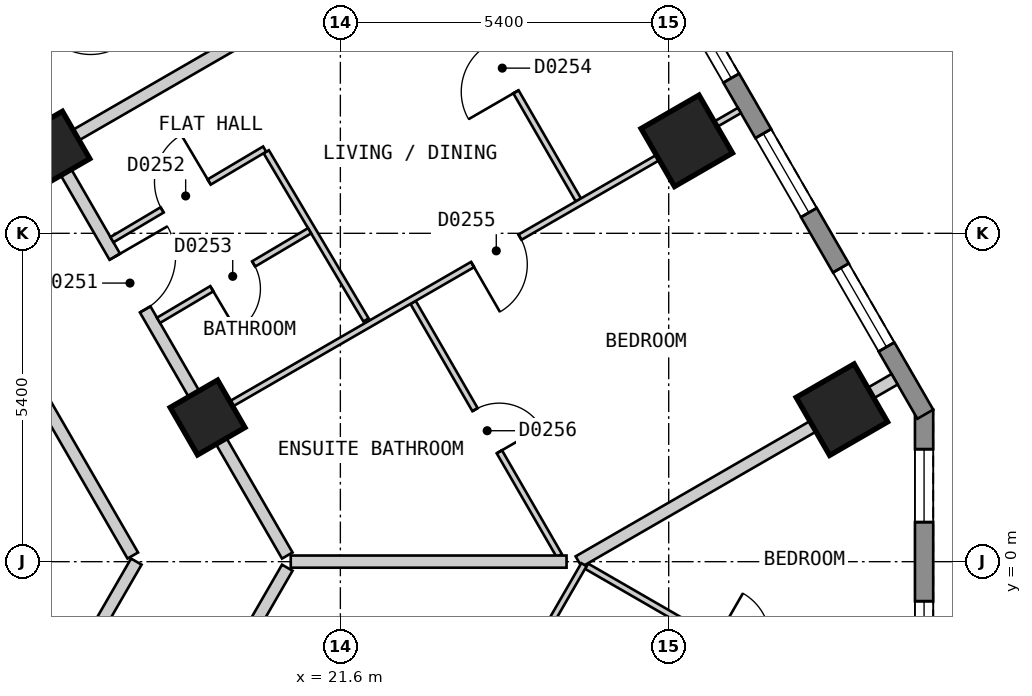
"""IFC4 building model, lengths in metres.
Left out: names, types, materials, properties, quantities, classifications, styles, units other than length and angle.
Written with IfcOpenShell. Run it as: python <this file> out.ifc"""

import sys

from ifc_helpers import new_model, si_unit, direction, frame, frame_2d, origin, origin_2d, place, context, subcontext, project, spatial, polyline, rectangle, outline, extrude, element, fill, save


model = new_model("IFC4")
c1 = context("Model", 3, precision=1e-05, world=origin(), true_north=direction((0.0, 1.0)))
c2 = subcontext(c1, "Body", "Model", "MODEL_VIEW")
j1 = project(units=[si_unit("LENGTHUNIT", "METRE"), si_unit("PLANEANGLEUNIT", "RADIAN")], contexts=[c1])
p1 = place(None, origin())
s1 = spatial("IfcSite", under=j1, at=p1, CompositionType="ELEMENT")
p2 = place(p1, origin())
s2 = spatial("IfcBuilding", under=s1, at=p2, CompositionType="ELEMENT")
p3 = place(p2, frame((0.0, 0.0, 47.4)))
s3 = spatial("IfcBuildingStorey", under=s2, at=p3, CompositionType="ELEMENT", Elevation=47.4)
for number, where, z_axis, x_axis in (
    (1, (29.848, 2.5, 0.0), (0.0, 0.0, 1.0), (-0.5, 0.866, 0.0)),
    (2, (27.297, 6.921, 0.0), (0.0, 0.0, 1.0), (-0.5, 0.866, 0.0)),
):
    element("IfcColumn", number, at=place(p3, frame(where, z_axis=z_axis, x_axis=x_axis)), inside=s3, PredefinedType="COLUMN", context=c2, shape_type="SweptSolid", body=[
        extrude(rectangle(XDim=1.1, YDim=1.1, at=origin_2d()), origin(), (0.0, 0.0, 1.0), 3.0),
    ])
for number, where, z_axis, x_axis in (
    (3, (19.416, 2.371, 0.0), (0.0, 0.0, 1.0), (-0.5, 0.866, 0.0)),
    (4, (16.864, 6.791, 0.0), (0.0, 0.0, 1.0), (-0.5, 0.866, 0.0)),
):
    element("IfcColumn", number, at=place(p3, frame(where, z_axis=z_axis, x_axis=x_axis)), inside=s3, PredefinedType="COLUMN", context=c2, shape_type="SweptSolid", body=[
        extrude(rectangle(XDim=0.9, YDim=0.9, at=origin_2d()), origin(), (0.0, 0.0, 1.0), 3.0),
    ])
p4 = place(p3, frame((31.2, -2.5, 0.0), z_axis=(0.0, 0.0, 1.0), x_axis=(0.0, 1.0, 0.0)))
e5 = element("IfcWall", 5, at=p4, inside=s3, PredefinedType="SOLIDWALL", context=c2, shape_type="SweptSolid", body=[
    extrude(outline(polyline([(0.0, -0.15), (5.0, -0.15), (4.92, 0.15), (0.08, 0.15), (0.0, -0.15)])), origin(), (0.0, 0.0, 1.0), 2.7),
])
p5 = place(p4, frame((0.65, 0.0, 0.15)))
e6 = element("IfcOpeningElement", 6, at=p5, cuts=e5, PredefinedType="OPENING", context=c2, shape_type="SweptSolid", body=[
    extrude(rectangle(XDim=1.2, YDim=2.1, at=frame_2d((0.6, 1.05))), frame((0.0, 0.16, 0.0), z_axis=(0.0, -1.0, 0.0), x_axis=(1.0, 0.0, 0.0)), (0.0, 0.0, 1.0), 0.32),
])
p6 = place(p4, frame((3.15, 0.0, 0.15)))
e7 = element("IfcOpeningElement", 7, at=p6, cuts=e5, PredefinedType="OPENING", context=c2, shape_type="SweptSolid", body=[
    extrude(rectangle(XDim=1.2, YDim=2.1, at=frame_2d((0.6, 1.05))), frame((0.0, 0.16, 0.0), z_axis=(0.0, -1.0, 0.0), x_axis=(1.0, 0.0, 0.0)), (0.0, 0.0, 1.0), 0.32),
])
p7 = place(p3, frame((31.22, 2.425, 0.0), z_axis=(0.0, 0.0, 1.0), x_axis=(-0.500001938803, 0.866024284413, 0.0)))
e8 = element("IfcWall", 8, at=p7, inside=s3, PredefinedType="SOLIDWALL", context=c2, shape_type="SweptSolid", body=[
    extrude(outline(polyline([(0.0, -0.15), (27.02, -0.15), (26.94, 0.15), (0.08, 0.15), (0.0, -0.15)])), origin(), (0.0, 0.0, 1.0), 2.7),
])
p8 = place(p7, frame((1.277, 0.0, 0.15)))
e9 = element("IfcOpeningElement", 9, at=p8, cuts=e8, PredefinedType="OPENING", context=c2, shape_type="SweptSolid", body=[
    extrude(rectangle(XDim=1.5, YDim=2.1, at=frame_2d((0.75, 1.05))), frame((0.0, 0.16, 0.0), z_axis=(0.0, -1.0, 0.0), x_axis=(1.0, 0.0, 0.0)), (0.0, 0.0, 1.0), 0.32),
])
p9 = place(p7, frame((3.829, 0.0, 0.15)))
e10 = element("IfcOpeningElement", 10, at=p9, cuts=e8, PredefinedType="OPENING", context=c2, shape_type="SweptSolid", body=[
    extrude(rectangle(XDim=1.5, YDim=2.1, at=frame_2d((0.75, 1.05))), frame((0.0, 0.16, 0.0), z_axis=(0.0, -1.0, 0.0), x_axis=(1.0, 0.0, 0.0)), (0.0, 0.0, 1.0), 0.32),
])
p10 = place(p7, frame((6.382, 0.0, 0.15)))
e11 = element("IfcOpeningElement", 11, at=p10, cuts=e8, PredefinedType="OPENING", context=c2, shape_type="SweptSolid", body=[
    extrude(rectangle(XDim=1.5, YDim=2.1, at=frame_2d((0.75, 1.05))), frame((0.0, 0.16, 0.0), z_axis=(0.0, -1.0, 0.0), x_axis=(1.0, 0.0, 0.0)), (0.0, 0.0, 1.0), 0.32),
])
p11 = place(p7, frame((8.933, 0.0, 0.15)))
e12 = element("IfcOpeningElement", 12, at=p11, cuts=e8, PredefinedType="OPENING", context=c2, shape_type="SweptSolid", body=[
    extrude(rectangle(XDim=1.5, YDim=2.1, at=frame_2d((0.75, 1.05))), frame((0.0, 0.16, 0.0), z_axis=(0.0, -1.0, 0.0), x_axis=(1.0, 0.0, 0.0)), (0.0, 0.0, 1.0), 0.32),
])
p12 = place(p7, frame((11.485, 0.0, 0.15)))
e13 = element("IfcOpeningElement", 13, at=p12, cuts=e8, PredefinedType="OPENING", context=c2, shape_type="SweptSolid", body=[
    extrude(rectangle(XDim=1.5, YDim=2.1, at=frame_2d((0.75, 1.05))), frame((0.0, 0.16, 0.0), z_axis=(0.0, -1.0, 0.0), x_axis=(1.0, 0.0, 0.0)), (0.0, 0.0, 1.0), 0.32),
])
p13 = place(p7, frame((14.037, 0.0, 0.15)))
e14 = element("IfcOpeningElement", 14, at=p13, cuts=e8, PredefinedType="OPENING", context=c2, shape_type="SweptSolid", body=[
    extrude(rectangle(XDim=1.5, YDim=2.1, at=frame_2d((0.75, 1.05))), frame((0.0, 0.16, 0.0), z_axis=(0.0, -1.0, 0.0), x_axis=(1.0, 0.0, 0.0)), (0.0, 0.0, 1.0), 0.32),
])
p14 = place(p7, frame((16.589, 0.0, 0.15)))
e15 = element("IfcOpeningElement", 15, at=p14, cuts=e8, PredefinedType="OPENING", context=c2, shape_type="SweptSolid", body=[
    extrude(rectangle(XDim=1.5, YDim=2.1, at=frame_2d((0.75, 1.05))), frame((0.0, 0.16, 0.0), z_axis=(0.0, -1.0, 0.0), x_axis=(1.0, 0.0, 0.0)), (0.0, 0.0, 1.0), 0.32),
])
p15 = place(p7, frame((19.141, 0.0, 0.15)))
e16 = element("IfcOpeningElement", 16, at=p15, cuts=e8, PredefinedType="OPENING", context=c2, shape_type="SweptSolid", body=[
    extrude(rectangle(XDim=1.5, YDim=2.1, at=frame_2d((0.75, 1.05))), frame((0.0, 0.16, 0.0), z_axis=(0.0, -1.0, 0.0), x_axis=(1.0, 0.0, 0.0)), (0.0, 0.0, 1.0), 0.32),
])
p16 = place(p7, frame((21.693, 0.0, 0.15)))
e17 = element("IfcOpeningElement", 17, at=p16, cuts=e8, PredefinedType="OPENING", context=c2, shape_type="SweptSolid", body=[
    extrude(rectangle(XDim=1.5, YDim=2.1, at=frame_2d((0.75, 1.05))), frame((0.0, 0.16, 0.0), z_axis=(0.0, -1.0, 0.0), x_axis=(1.0, 0.0, 0.0)), (0.0, 0.0, 1.0), 0.32),
])
p17 = place(p7, frame((24.244, 0.0, 0.15)))
e18 = element("IfcOpeningElement", 18, at=p17, cuts=e8, PredefinedType="OPENING", context=c2, shape_type="SweptSolid", body=[
    extrude(rectangle(XDim=1.5, YDim=2.1, at=frame_2d((0.75, 1.05))), frame((0.0, 0.16, 0.0), z_axis=(0.0, -1.0, 0.0), x_axis=(1.0, 0.0, 0.0)), (0.0, 0.0, 1.0), 0.32),
])
p18 = place(p3, frame((9.18, 15.7, 0.0), z_axis=(0.0, 0.0, 1.0), x_axis=(0.500003652032, -0.866023295272, 0.0)))
e19 = element("IfcWall", 19, at=p18, inside=s3, PredefinedType="PARTITIONING", context=c2, shape_type="SweptSolid", body=[
    extrude(rectangle(XDim=18.012, YDim=0.2, at=frame_2d((9.006, 0.0))), origin(), (0.0, 0.0, 1.0), 2.7),
])
p19 = place(p18, frame((8.556, 0.0, 0.0)))
e20 = element("IfcOpeningElement", 20, at=p19, cuts=e19, PredefinedType="OPENING", context=c2, shape_type="SweptSolid", body=[
    extrude(rectangle(XDim=0.9, YDim=2.1, at=frame_2d((0.45, 1.05))), frame((0.0, 0.11, 0.0), z_axis=(0.0, -1.0, 0.0), x_axis=(1.0, 0.0, 0.0)), (0.0, 0.0, 1.0), 0.22),
])
p20 = place(p3, frame((10.45, 17.9, 0.0), z_axis=(0.0, 0.0, 1.0), x_axis=(0.500034352617, -0.866005569383, 0.0)))
e21 = element("IfcWall", 21, at=p20, inside=s3, PredefinedType="PARTITIONING", context=c2, shape_type="SweptSolid", body=[
    extrude(rectangle(XDim=20.553, YDim=0.2, at=frame_2d((10.276, 0.0))), origin(), (0.0, 0.0, 1.0), 2.7),
])
p21 = place(p20, frame((14.879, 0.0, 0.0)))
e22 = element("IfcOpeningElement", 22, at=p21, cuts=e21, PredefinedType="OPENING", context=c2, shape_type="SweptSolid", body=[
    extrude(rectangle(XDim=1.0, YDim=2.1, at=frame_2d((0.5, 1.05))), frame((0.0, 0.11, 0.0), z_axis=(0.0, -1.0, 0.0), x_axis=(1.0, 0.0, 0.0)), (0.0, 0.0, 1.0), 0.22),
])
p22 = place(p20, frame((9.775, 0.0, 0.0)))
e23 = element("IfcOpeningElement", 23, at=p22, cuts=e21, PredefinedType="OPENING", context=c2, shape_type="SweptSolid", body=[
    extrude(rectangle(XDim=1.0, YDim=2.1, at=frame_2d((0.5, 1.05))), frame((0.0, 0.11, 0.0), z_axis=(0.0, -1.0, 0.0), x_axis=(1.0, 0.0, 0.0)), (0.0, 0.0, 1.0), 0.22),
])
p23 = place(p20, frame((4.671, 0.0, 0.0)))
e24 = element("IfcOpeningElement", 24, at=p23, cuts=e21, PredefinedType="OPENING", context=c2, shape_type="SweptSolid", body=[
    extrude(rectangle(XDim=1.0, YDim=2.1, at=frame_2d((0.5, 1.05))), frame((0.0, 0.11, 0.0), z_axis=(0.0, -1.0, 0.0), x_axis=(1.0, 0.0, 0.0)), (0.0, 0.0, 1.0), 0.22),
])
p24 = place(p3, frame((15.6, -4.579, 0.0), z_axis=(0.0, 0.0, 1.0), x_axis=(0.499927597274, 0.866067201483, 0.0)))
e25 = element("IfcWall", 25, at=p24, inside=s3, PredefinedType="PARTITIONING", context=c2, shape_type="SweptSolid", body=[
    extrude(rectangle(XDim=5.288, YDim=0.2, at=frame_2d((2.644, 0.0))), origin(), (0.0, 0.0, 1.0), 2.7),
])
p25 = place(p3, frame((16.864, -6.789, 0.0), z_axis=(0.0, 0.0, 1.0), x_axis=(0.500058020612, 0.865991902977, 0.0)))
e26 = element("IfcWall", 26, at=p25, inside=s3, PredefinedType="PARTITIONING", context=c2, shape_type="SweptSolid", body=[
    extrude(rectangle(XDim=7.725, YDim=0.2, at=frame_2d((3.863, 0.0))), origin(), (0.0, 0.0, 1.0), 2.7),
])
p26 = place(p25, frame((2.052, 0.0, 0.0)))
e27 = element("IfcOpeningElement", 27, at=p26, cuts=e26, PredefinedType="OPENING", context=c2, shape_type="SweptSolid", body=[
    extrude(rectangle(XDim=1.0, YDim=2.1, at=frame_2d((0.5, 1.05))), frame((0.0, 0.11, 0.0), z_axis=(0.0, -1.0, 0.0), x_axis=(1.0, 0.0, 0.0)), (0.0, 0.0, 1.0), 0.22),
])
p27 = place(p3, frame((20.381, 6.741, 0.0), z_axis=(0.0, 0.0, 1.0), x_axis=(0.510224755389, -0.860041103081, 0.0)))
e28 = element("IfcWall", 28, at=p27, inside=s3, PredefinedType="PARTITIONING", context=c2, shape_type="SweptSolid", body=[
    extrude(rectangle(XDim=3.216, YDim=0.1, at=frame_2d((1.608, 0.0))), origin(), (0.0, 0.0, 1.0), 2.7),
])
p28 = place(p3, frame((22.796, 4.264, 0.0), z_axis=(0.0, 0.0, 1.0), x_axis=(0.500099052605, -0.865968208183, 0.0)))
e29 = element("IfcWall", 29, at=p28, inside=s3, PredefinedType="PARTITIONING", context=c2, shape_type="SweptSolid", body=[
    extrude(rectangle(XDim=4.807, YDim=0.1, at=frame_2d((2.404, 0.0))), origin(), (0.0, 0.0, 1.0), 2.7),
])
p29 = place(p28, frame((2.037, 0.0, 0.0)))
e30 = element("IfcOpeningElement", 30, at=p29, cuts=e29, PredefinedType="OPENING", context=c2, shape_type="SweptSolid", body=[
    extrude(rectangle(XDim=0.8, YDim=2.1, at=frame_2d((0.4, 1.05))), frame((0.0, 0.06, 0.0), z_axis=(0.0, -1.0, 0.0), x_axis=(1.0, 0.0, 0.0)), (0.0, 0.0, 1.0), 0.12),
])
p30 = place(p3, frame((23.037, 10.24, 0.0), z_axis=(0.0, 0.0, 1.0), x_axis=(0.499907296314, -0.866078919667, 0.0)))
e31 = element("IfcWall", 31, at=p30, inside=s3, PredefinedType="PARTITIONING", context=c2, shape_type="SweptSolid", body=[
    extrude(rectangle(XDim=4.955, YDim=0.1, at=frame_2d((2.477, 0.0))), origin(), (0.0, 0.0, 1.0), 2.7),
])
p31 = place(p30, frame((2.002, 0.0, 0.0)))
e32 = element("IfcOpeningElement", 32, at=p31, cuts=e31, PredefinedType="OPENING", context=c2, shape_type="SweptSolid", body=[
    extrude(rectangle(XDim=0.9, YDim=2.1, at=frame_2d((0.45, 1.05))), frame((0.0, 0.06, 0.0), z_axis=(0.0, -1.0, 0.0), x_axis=(1.0, 0.0, 0.0)), (0.0, 0.0, 1.0), 0.12),
])
p32 = place(p3, frame((25.649, -0.074, 0.0), z_axis=(0.0, 0.0, 1.0), x_axis=(0.866059819573, -0.499940385368, 0.0)))
e33 = element("IfcWall", 33, at=p32, inside=s3, PredefinedType="PARTITIONING", context=c2, shape_type="SweptSolid", body=[
    extrude(rectangle(XDim=5.851, YDim=0.1, at=frame_2d((2.925, 0.0))), origin(), (0.0, 0.0, 1.0), 2.7),
])
p33 = place(p32, frame((2.45, 0.0, 0.0)))
e34 = element("IfcOpeningElement", 34, at=p33, cuts=e33, PredefinedType="OPENING", context=c2, shape_type="SweptSolid", body=[
    extrude(rectangle(XDim=0.9, YDim=2.1, at=frame_2d((0.45, 1.05))), frame((0.0, 0.06, 0.0), z_axis=(0.0, -1.0, 0.0), x_axis=(1.0, 0.0, 0.0)), (0.0, 0.0, 1.0), 0.12),
])
p34 = place(p3, frame((19.503, 2.421, 0.0), z_axis=(0.0, 0.0, 1.0), x_axis=(0.866065245018, 0.499930986609, 0.0)))
e35 = element("IfcWall", 35, at=p34, inside=s3, PredefinedType="PARTITIONING", context=c2, shape_type="SweptSolid", body=[
    extrude(rectangle(XDim=10.0, YDim=0.1, at=frame_2d((5.0, 0.0))), origin(), (0.0, 0.0, 1.0), 2.7),
])
p35 = place(p34, frame((4.932, 0.0, 0.0)))
e36 = element("IfcOpeningElement", 36, at=p35, cuts=e35, PredefinedType="OPENING", context=c2, shape_type="SweptSolid", body=[
    extrude(rectangle(XDim=0.9, YDim=2.1, at=frame_2d((0.45, 1.05))), frame((0.0, 0.06, 0.0), z_axis=(0.0, -1.0, 0.0), x_axis=(1.0, 0.0, 0.0)), (0.0, 0.0, 1.0), 0.12),
])
p36 = place(p3, frame((17.843, 5.295, 0.0), z_axis=(0.0, 0.0, 1.0), x_axis=(0.860078277555, 0.510162088436, 0.0)))
e37 = element("IfcWall", 37, at=p36, inside=s3, PredefinedType="PARTITIONING", context=c2, shape_type="SweptSolid", body=[
    extrude(rectangle(XDim=2.921, YDim=0.1, at=frame_2d((1.46, 0.0))), origin(), (0.0, 0.0, 1.0), 2.7),
])
p37 = place(p36, frame((0.96, 0.0, 0.0)))
e38 = element("IfcOpeningElement", 38, at=p37, cuts=e37, PredefinedType="OPENING", context=c2, shape_type="SweptSolid", body=[
    extrude(rectangle(XDim=0.9, YDim=2.1, at=frame_2d((0.45, 1.05))), frame((0.0, 0.06, 0.0), z_axis=(0.0, -1.0, 0.0), x_axis=(1.0, 0.0, 0.0)), (0.0, 0.0, 1.0), 0.12),
])
p38 = place(p3, frame((18.609, 3.969, 0.0), z_axis=(0.0, 0.0, 1.0), x_axis=(0.860254465905, 0.50986493691, 0.0)))
e39 = element("IfcWall", 39, at=p38, inside=s3, PredefinedType="PARTITIONING", context=c2, shape_type="SweptSolid", body=[
    extrude(rectangle(XDim=2.889, YDim=0.1, at=frame_2d((1.444, 0.0))), origin(), (0.0, 0.0, 1.0), 2.7),
])
p39 = place(p38, frame((1.019, 0.0, 0.0)))
e40 = element("IfcOpeningElement", 40, at=p39, cuts=e39, PredefinedType="OPENING", context=c2, shape_type="SweptSolid", body=[
    extrude(rectangle(XDim=0.8, YDim=2.1, at=frame_2d((0.4, 1.05))), frame((0.0, 0.06, 0.0), z_axis=(0.0, -1.0, 0.0), x_axis=(1.0, 0.0, 0.0)), (0.0, 0.0, 1.0), 0.12),
])
p40 = place(p3, frame((16.057, 8.389, 0.0), z_axis=(0.0, 0.0, 1.0), x_axis=(0.860036770423, 0.510232058499, 0.0)))
e41 = element("IfcWall", 41, at=p40, inside=s3, PredefinedType="PARTITIONING", context=c2, shape_type="SweptSolid", body=[
    extrude(rectangle(XDim=2.538, YDim=0.1, at=frame_2d((1.269, 0.0))), origin(), (0.0, 0.0, 1.0), 2.7),
])
p41 = place(p40, frame((0.769, 0.0, 0.0)))
e42 = element("IfcOpeningElement", 42, at=p41, cuts=e41, PredefinedType="OPENING", context=c2, shape_type="SweptSolid", body=[
    extrude(rectangle(XDim=0.9, YDim=2.1, at=frame_2d((0.45, 1.05))), frame((0.0, 0.06, 0.0), z_axis=(0.0, -1.0, 0.0), x_axis=(1.0, 0.0, 0.0)), (0.0, 0.0, 1.0), 0.12),
])
p42 = place(p3, frame((20.784, 0.001, 0.0), z_axis=(0.0, 0.0, 1.0), x_axis=(1.0, 0.0, 0.0)))
e43 = element("IfcWall", 43, at=p42, inside=s3, PredefinedType="PARTITIONING", context=c2, shape_type="SweptSolid", body=[
    extrude(rectangle(XDim=4.536, YDim=0.2, at=frame_2d((2.268, 0.0))), origin(), (0.0, 0.0, 1.0), 2.7),
])
p43 = place(p3, frame((25.519, 0.001, 0.0), z_axis=(0.0, 0.0, 1.0), x_axis=(0.86609140076, 0.499885672459, 0.0)))
e44 = element("IfcWall", 44, at=p43, inside=s3, PredefinedType="PARTITIONING", context=c2, shape_type="SweptSolid", body=[
    extrude(rectangle(XDim=6.0, YDim=0.2, at=frame_2d((3.0, 0.0))), origin(), (0.0, 0.0, 1.0), 2.7),
])
p44 = place(p3, frame((16.95, 6.841, 0.0), z_axis=(0.0, 0.0, 1.0), x_axis=(0.866022959057, 0.500004234368, 0.0)))
e45 = element("IfcWall", 45, at=p44, inside=s3, PredefinedType="PARTITIONING", context=c2, shape_type="SweptSolid", body=[
    extrude(rectangle(XDim=10.0, YDim=0.2, at=frame_2d((5.0, 0.0))), origin(), (0.0, 0.0, 1.0), 2.7),
])
p45 = place(p3, frame((23.054, -4.469, 0.0), z_axis=(0.0, 0.0, 1.0), x_axis=(0.500023345639, 0.866011924754, 0.0)))
e46 = element("IfcWall", 46, at=p45, inside=s3, PredefinedType="PARTITIONING", context=c2, shape_type="SweptSolid", body=[
    extrude(rectangle(XDim=5.104, YDim=0.1, at=frame_2d((2.552, 0.0))), origin(), (0.0, 0.0, 1.0), 2.7),
])
p46 = place(p45, frame((2.152, 0.0, 0.0)))
e47 = element("IfcOpeningElement", 47, at=p46, cuts=e46, PredefinedType="OPENING", context=c2, shape_type="SweptSolid", body=[
    extrude(rectangle(XDim=0.8, YDim=2.1, at=frame_2d((0.4, 1.05))), frame((0.0, 0.06, 0.0), z_axis=(0.0, -1.0, 0.0), x_axis=(1.0, 0.0, 0.0)), (0.0, 0.0, 1.0), 0.12),
])
p47 = place(p5, origin())
e48 = element("IfcWindow", 48, at=p47, inside=s3, PartitioningType="SINGLE_PANEL", PredefinedType="WINDOW", context=c2, shape_type="SweptSolid", body=[
    extrude(rectangle(XDim=1.2, YDim=2.1, at=frame_2d((0.6, 1.05))), frame((0.0, 0.03, 0.0), z_axis=(0.0, -1.0, 0.0), x_axis=(1.0, 0.0, 0.0)), (0.0, 0.0, 1.0), 0.06),
])
fill(e6, e48)
p48 = place(p6, origin())
e49 = element("IfcWindow", 49, at=p48, inside=s3, PartitioningType="SINGLE_PANEL", PredefinedType="WINDOW", context=c2, shape_type="SweptSolid", body=[
    extrude(rectangle(XDim=1.2, YDim=2.1, at=frame_2d((0.6, 1.05))), frame((0.0, 0.03, 0.0), z_axis=(0.0, -1.0, 0.0), x_axis=(1.0, 0.0, 0.0)), (0.0, 0.0, 1.0), 0.06),
])
fill(e7, e49)
p49 = place(p8, origin())
e50 = element("IfcWindow", 50, at=p49, inside=s3, PartitioningType="SINGLE_PANEL", PredefinedType="WINDOW", context=c2, shape_type="SweptSolid", body=[
    extrude(rectangle(XDim=1.5, YDim=2.1, at=frame_2d((0.75, 1.05))), frame((0.0, 0.03, 0.0), z_axis=(0.0, -1.0, 0.0), x_axis=(1.0, 0.0, 0.0)), (0.0, 0.0, 1.0), 0.06),
])
fill(e9, e50)
p50 = place(p9, origin())
e51 = element("IfcWindow", 51, at=p50, inside=s3, PartitioningType="SINGLE_PANEL", PredefinedType="WINDOW", context=c2, shape_type="SweptSolid", body=[
    extrude(rectangle(XDim=1.5, YDim=2.1, at=frame_2d((0.75, 1.05))), frame((0.0, 0.03, 0.0), z_axis=(0.0, -1.0, 0.0), x_axis=(1.0, 0.0, 0.0)), (0.0, 0.0, 1.0), 0.06),
])
fill(e10, e51)
p51 = place(p10, origin())
e52 = element("IfcWindow", 52, at=p51, inside=s3, PartitioningType="SINGLE_PANEL", PredefinedType="WINDOW", context=c2, shape_type="SweptSolid", body=[
    extrude(rectangle(XDim=1.5, YDim=2.1, at=frame_2d((0.75, 1.05))), frame((0.0, 0.03, 0.0), z_axis=(0.0, -1.0, 0.0), x_axis=(1.0, 0.0, 0.0)), (0.0, 0.0, 1.0), 0.06),
])
fill(e11, e52)
p52 = place(p21, origin())
e53 = element("IfcDoor", 53, at=p52, inside=s3, OperationType="SINGLE_SWING_LEFT", PredefinedType="DOOR", context=c2, shape_type="SweptSolid", body=[
    extrude(rectangle(XDim=1.0, YDim=2.1, at=frame_2d((0.5, 1.05))), frame((0.0, 0.025, 0.0), z_axis=(0.0, -1.0, 0.0), x_axis=(1.0, 0.0, 0.0)), (0.0, 0.0, 1.0), 0.05),
])
fill(e22, e53)
p53 = place(p37, origin())
e54 = element("IfcDoor", 54, at=p53, inside=s3, OperationType="SINGLE_SWING_RIGHT", PredefinedType="DOOR", context=c2, shape_type="SweptSolid", body=[
    extrude(rectangle(XDim=0.9, YDim=2.1, at=frame_2d((0.45, 1.05))), frame((0.0, 0.025, 0.0), z_axis=(0.0, -1.0, 0.0), x_axis=(1.0, 0.0, 0.0)), (0.0, 0.0, 1.0), 0.05),
])
fill(e38, e54)
p54 = place(p39, origin())
e55 = element("IfcDoor", 55, at=p54, inside=s3, OperationType="SINGLE_SWING_LEFT", PredefinedType="DOOR", context=c2, shape_type="SweptSolid", body=[
    extrude(rectangle(XDim=0.8, YDim=2.1, at=frame_2d((0.4, 1.05))), frame((0.0, 0.025, 0.0), z_axis=(0.0, -1.0, 0.0), x_axis=(1.0, 0.0, 0.0)), (0.0, 0.0, 1.0), 0.05),
])
fill(e40, e55)
p55 = place(p31, origin())
e56 = element("IfcDoor", 56, at=p55, inside=s3, OperationType="SINGLE_SWING_RIGHT", PredefinedType="DOOR", context=c2, shape_type="SweptSolid", body=[
    extrude(rectangle(XDim=0.9, YDim=2.1, at=frame_2d((0.45, 1.05))), frame((0.0, 0.025, 0.0), z_axis=(0.0, -1.0, 0.0), x_axis=(1.0, 0.0, 0.0)), (0.0, 0.0, 1.0), 0.05),
])
fill(e32, e56)
p56 = place(p35, origin())
e57 = element("IfcDoor", 57, at=p56, inside=s3, OperationType="SINGLE_SWING_LEFT", PredefinedType="DOOR", context=c2, shape_type="SweptSolid", body=[
    extrude(rectangle(XDim=0.9, YDim=2.1, at=frame_2d((0.45, 1.05))), frame((0.0, 0.025, 0.0), z_axis=(0.0, -1.0, 0.0), x_axis=(1.0, 0.0, 0.0)), (0.0, 0.0, 1.0), 0.05),
])
fill(e36, e57)
p57 = place(p29, origin())
e58 = element("IfcDoor", 58, at=p57, inside=s3, OperationType="SINGLE_SWING_RIGHT", PredefinedType="DOOR", context=c2, shape_type="SweptSolid", body=[
    extrude(rectangle(XDim=0.8, YDim=2.1, at=frame_2d((0.4, 1.05))), frame((0.0, 0.025, 0.0), z_axis=(0.0, -1.0, 0.0), x_axis=(1.0, 0.0, 0.0)), (0.0, 0.0, 1.0), 0.05),
])
fill(e30, e58)
save(model, sys.argv[1])
